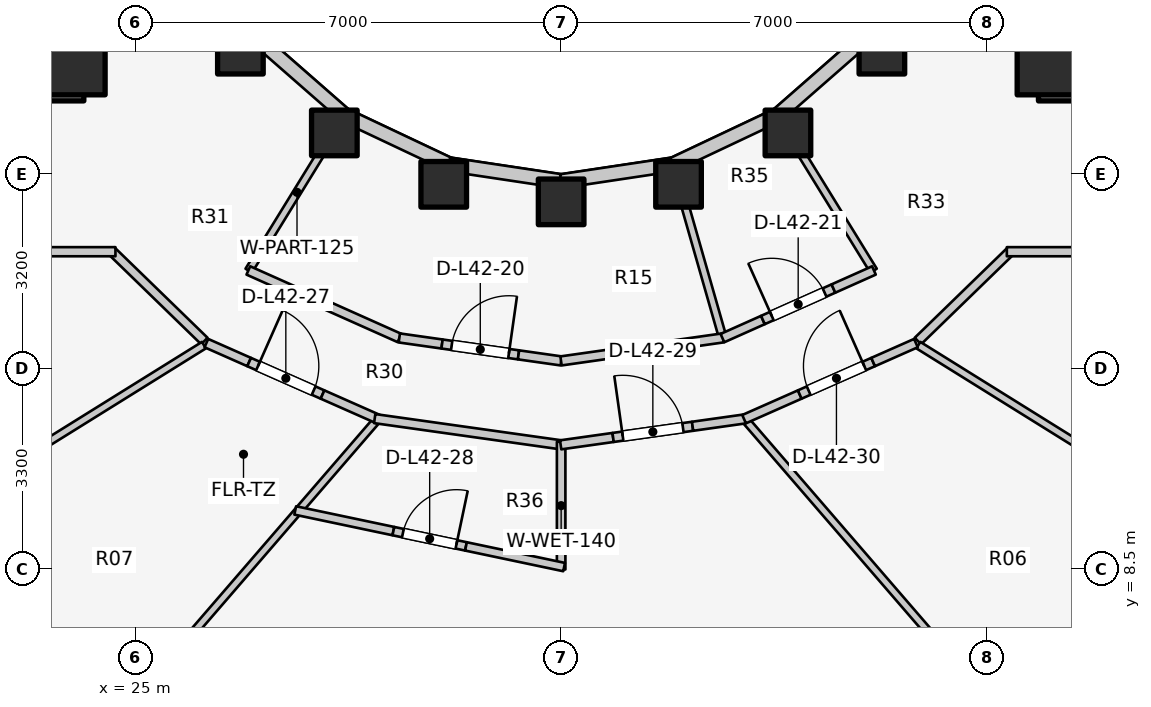
"""IFC4 building model, lengths in metres.
Left out: names, types, materials, properties, quantities, classifications, styles, units other than length and angle.
Written with IfcOpenShell. Run it as: python <this file> out.ifc"""

import sys

from ifc_helpers import new_model, si_unit, direction, frame, frame_2d, origin, origin_2d, place, context, subcontext, project, spatial, rectangle, extrude, element, fill, save


model = new_model("IFC4")
c1 = context("Model", 3, precision=1e-05, world=origin(), true_north=direction((0.0, 1.0)))
c2 = subcontext(c1, "Body", "Model", "MODEL_VIEW")
j1 = project(units=[si_unit("LENGTHUNIT", "METRE"), si_unit("PLANEANGLEUNIT", "RADIAN")], contexts=[c1])
p1 = place(None, origin())
s1 = spatial("IfcSite", under=j1, at=p1, CompositionType="ELEMENT")
p2 = place(p1, origin())
s2 = spatial("IfcBuilding", under=s1, at=p2, CompositionType="ELEMENT")
p3 = place(p2, frame((0.0, 0.0, 140.5)))
s3 = spatial("IfcBuildingStorey", under=s2, at=p3, CompositionType="ELEMENT", Elevation=140.5)
for number, where, z_axis, x_axis in (
    (1, (19.65, 16.55, 0.0), (0.0, 0.0, 1.0), (1.0, 0.0, 0.0)),
    (2, (39.85, 16.55, 0.0), (0.0, 0.0, 1.0), (1.0, 0.0, 0.0)),
):
    element("IfcWall", number, at=place(p3, frame(where, z_axis=z_axis, x_axis=x_axis)), inside=s3, PredefinedType="SHEAR", context=c2, shape_type="SweptSolid", body=[
        extrude(rectangle(XDim=4.5, YDim=0.7, at=frame_2d((2.25, 0.0))), origin(), (0.0, 0.0, 1.0), 3.1),
    ])
for number, where, z_axis, x_axis in (
    (3, (23.9, 16.9, 0.0), (0.0, 0.0, 1.0), (1.0, 0.0, 0.0)),
    (4, (40.1, 16.9, 0.0), (0.0, 0.0, 1.0), (1.0, 0.0, 0.0)),
):
    element("IfcColumn", number, at=place(p3, frame(where, z_axis=z_axis, x_axis=x_axis)), inside=s3, PredefinedType="COLUMN", context=c2, shape_type="SweptSolid", body=[
        extrude(rectangle(XDim=1.2, YDim=1.2, at=origin_2d()), origin(), (0.0, 0.0, 1.0), 3.1),
    ])
for number, where, z_axis, x_axis in (
    (5, (26.725, 17.018, 0.0), (0.0, 0.0, 1.0), (1.0, 0.0, 0.0)),
    (6, (28.27, 15.673, 0.0), (0.0, 0.0, 1.0), (1.0, 0.0, 0.0)),
    (7, (30.069, 14.828, 0.0), (0.0, 0.0, 1.0), (1.0, 0.0, 0.0)),
    (8, (32.0, 14.54, 0.0), (0.0, 0.0, 1.0), (1.0, 0.0, 0.0)),
    (9, (33.931, 14.828, 0.0), (0.0, 0.0, 1.0), (1.0, 0.0, 0.0)),
    (10, (35.73, 15.673, 0.0), (0.0, 0.0, 1.0), (1.0, 0.0, 0.0)),
    (11, (37.275, 17.018, 0.0), (0.0, 0.0, 1.0), (1.0, 0.0, 0.0)),
):
    element("IfcColumn", number, at=place(p3, frame(where, z_axis=z_axis, x_axis=x_axis)), inside=s3, PredefinedType="COLUMN", context=c2, shape_type="SweptSolid", body=[
        extrude(rectangle(XDim=0.75, YDim=0.75, at=origin_2d()), origin(), (0.0, 0.0, 1.0), 3.1),
    ])
p4 = place(p3, frame((26.965, 17.258, 0.0), z_axis=(0.0, 0.0, 1.0), x_axis=(0.752576694707, -0.658504607869, 0.0)))
e12 = element("IfcWall", 12, at=p4, inside=s3, PredefinedType="STANDARD", context=c2, shape_type="SweptSolid", body=[
    extrude(rectangle(XDim=1.959, YDim=0.23, at=frame_2d((0.98, 0.0))), origin(), (0.0, 0.0, 1.0), 1.22),
])
p5 = place(p3, frame((28.44, 15.968, 0.0), z_axis=(0.0, 0.0, 1.0), x_axis=(0.904179699603, -0.427152280606, 0.0)))
e13 = element("IfcWall", 13, at=p5, inside=s3, PredefinedType="STANDARD", context=c2, shape_type="SweptSolid", body=[
    extrude(rectangle(XDim=1.899, YDim=0.23, at=frame_2d((0.95, 0.0))), origin(), (0.0, 0.0, 1.0), 1.22),
])
for number, where, z_axis, x_axis in (
    (14, (30.157, 15.157, 0.0), (0.0, 0.0, 1.0), (0.989, -0.149, 0.0)),
    (15, (32.0, 14.88, 0.0), (0.0, 0.0, 1.0), (0.989, 0.149, 0.0)),
):
    element("IfcWall", number, at=place(p3, frame(where, z_axis=z_axis, x_axis=x_axis)), inside=s3, PredefinedType="STANDARD", context=c2, shape_type="SweptSolid", body=[
        extrude(rectangle(XDim=1.864, YDim=0.23, at=frame_2d((0.932, 0.0))), origin(), (0.0, 0.0, 1.0), 1.22),
    ])
p6 = place(p3, frame((33.843, 15.157, 0.0), z_axis=(0.0, 0.0, 1.0), x_axis=(0.904179699603, 0.427152280606, 0.0)))
e16 = element("IfcWall", 16, at=p6, inside=s3, PredefinedType="STANDARD", context=c2, shape_type="SweptSolid", body=[
    extrude(rectangle(XDim=1.899, YDim=0.23, at=frame_2d((0.95, 0.0))), origin(), (0.0, 0.0, 1.0), 1.22),
])
p7 = place(p3, frame((35.56, 15.968, 0.0), z_axis=(0.0, 0.0, 1.0), x_axis=(0.752576694707, 0.658504607869, 0.0)))
e17 = element("IfcWall", 17, at=p7, inside=s3, PredefinedType="STANDARD", context=c2, shape_type="SweptSolid", body=[
    extrude(rectangle(XDim=1.959, YDim=0.23, at=frame_2d((0.98, 0.0))), origin(), (0.0, 0.0, 1.0), 1.22),
])
p8 = place(p3, frame((19.587, 7.581, 0.0), z_axis=(0.0, 0.0, 1.0), x_axis=(0.912353637112, -0.409403029847, 0.0)))
e18 = element("IfcWall", 18, at=p8, inside=s3, PredefinedType="STANDARD", context=c2, shape_type="SweptSolid", body=[
    extrude(rectangle(XDim=5.533, YDim=0.26, at=frame_2d((2.766, 0.0))), origin(), (0.0, 0.0, 1.0), 1.22),
])
p9 = place(p8, frame((2.167, 0.0, 0.15)))
e19 = element("IfcOpeningElement", 19, at=p9, cuts=e18, PredefinedType="OPENING", context=c2, shape_type="SweptSolid", body=[
    extrude(rectangle(XDim=1.2, YDim=0.9, at=frame_2d((0.6, 0.45))), frame((0.0, 0.14, 0.0), z_axis=(0.0, -1.0, 0.0), x_axis=(1.0, 0.0, 0.0)), (0.0, 0.0, 1.0), 0.28),
])
p10 = place(p3, frame((39.365, 5.315, 0.0), z_axis=(0.0, 0.0, 1.0), x_axis=(0.912353637112, 0.409403029847, 0.0)))
e20 = element("IfcWall", 20, at=p10, inside=s3, PredefinedType="STANDARD", context=c2, shape_type="SweptSolid", body=[
    extrude(rectangle(XDim=5.533, YDim=0.26, at=frame_2d((2.766, 0.0))), origin(), (0.0, 0.0, 1.0), 1.22),
])
p11 = place(p10, frame((2.167, 0.0, 0.15)))
e21 = element("IfcOpeningElement", 21, at=p11, cuts=e20, PredefinedType="OPENING", context=c2, shape_type="SweptSolid", body=[
    extrude(rectangle(XDim=1.2, YDim=0.9, at=frame_2d((0.6, 0.45))), frame((0.0, 0.14, 0.0), z_axis=(0.0, -1.0, 0.0), x_axis=(1.0, 0.0, 0.0)), (0.0, 0.0, 1.0), 0.28),
])
p12 = place(p3, frame((26.133, 12.251, 0.0), z_axis=(0.0, 0.0, 1.0), x_axis=(-0.717419568599, 0.696641344302, 0.0)))
e22 = element("IfcWall", 22, at=p12, inside=s3, PredefinedType="PARTITIONING", context=c2, shape_type="SweptSolid", body=[
    extrude(rectangle(XDim=2.138, YDim=0.15, at=frame_2d((1.069, 0.0))), origin(), (0.0, 0.0, 1.0), 2.019),
])
p13 = place(p3, frame((19.51, 13.72, 0.0), z_axis=(0.0, 0.0, 1.0), x_axis=(1.0, 0.0, 0.0)))
e23 = element("IfcWall", 23, at=p13, inside=s3, PredefinedType="PARTITIONING", context=c2, shape_type="SweptSolid", body=[
    extrude(rectangle(XDim=5.16, YDim=0.15, at=frame_2d((2.58, 0.0))), origin(), (0.0, 0.0, 1.0), 2.019),
])
p14 = place(p3, frame((37.867, 12.251, 0.0), z_axis=(0.0, 0.0, 1.0), x_axis=(0.717419568599, 0.696641344302, 0.0)))
e24 = element("IfcWall", 24, at=p14, inside=s3, PredefinedType="PARTITIONING", context=c2, shape_type="SweptSolid", body=[
    extrude(rectangle(XDim=2.138, YDim=0.15, at=frame_2d((1.069, 0.0))), origin(), (0.0, 0.0, 1.0), 2.019),
])
p15 = place(p3, frame((39.33, 13.72, 0.0), z_axis=(0.0, 0.0, 1.0), x_axis=(1.0, 0.0, 0.0)))
e25 = element("IfcWall", 25, at=p15, inside=s3, PredefinedType="PARTITIONING", context=c2, shape_type="SweptSolid", body=[
    extrude(rectangle(XDim=5.06, YDim=0.15, at=frame_2d((2.53, 0.0))), origin(), (0.0, 0.0, 1.0), 2.019),
])
p16 = place(p3, frame((28.45, 15.985, 0.0), z_axis=(0.0, 0.0, 1.0), x_axis=(-0.524565340045, -0.851370192116, 0.0)))
e26 = element("IfcWall", 26, at=p16, inside=s3, PredefinedType="PARTITIONING", context=c2, shape_type="SweptSolid", body=[
    extrude(rectangle(XDim=3.027, YDim=0.125, at=frame_2d((1.514, 0.0))), origin(), (0.0, 0.0, 1.0), 2.019),
])
p17 = place(p3, frame((33.838, 15.176, 0.0), z_axis=(0.0, 0.0, 1.0), x_axis=(0.274947609893, -0.961459209647, 0.0)))
e27 = element("IfcWall", 27, at=p17, inside=s3, PredefinedType="PARTITIONING", context=c2, shape_type="SweptSolid", body=[
    extrude(rectangle(XDim=2.99, YDim=0.125, at=frame_2d((1.495, 0.0))), origin(), (0.0, 0.0, 1.0), 2.019),
])
p18 = place(p3, frame((35.55, 15.985, 0.0), z_axis=(0.0, 0.0, 1.0), x_axis=(0.524565340045, -0.851370192116, 0.0)))
e28 = element("IfcWall", 28, at=p18, inside=s3, PredefinedType="PARTITIONING", context=c2, shape_type="SweptSolid", body=[
    extrude(rectangle(XDim=3.027, YDim=0.125, at=frame_2d((1.514, 0.0))), origin(), (0.0, 0.0, 1.0), 2.019),
])
p19 = place(p3, frame((26.856, 13.412, 0.0), z_axis=(0.0, 0.0, 1.0), x_axis=(0.912985265053, -0.407992531545, 0.0)))
e29 = element("IfcWall", 29, at=p19, inside=s3, PredefinedType="PARTITIONING", context=c2, shape_type="SweptSolid", body=[
    extrude(rectangle(XDim=2.723, YDim=0.15, at=frame_2d((1.362, 0.0))), origin(), (0.0, 0.0, 1.0), 2.019),
])
p20 = place(p3, frame((29.339, 12.302, 0.0), z_axis=(0.0, 0.0, 1.0), x_axis=(0.99005923875, -0.140650999878, 0.0)))
e30 = element("IfcWall", 30, at=p20, inside=s3, PredefinedType="PARTITIONING", context=c2, shape_type="SweptSolid", body=[
    extrude(rectangle(XDim=0.71, YDim=0.15, at=frame_2d((0.355, 0.0))), origin(), (0.0, 0.0, 1.0), 2.575),
])
p21 = place(p3, frame((30.042, 12.202, 0.0), z_axis=(0.0, 0.0, 1.0), x_axis=(0.990075978744, -0.140533114653, 0.0)))
e31 = element("IfcWall", 31, at=p21, inside=s3, PredefinedType="PARTITIONING", context=c2, shape_type="SweptSolid", body=[
    extrude(rectangle(XDim=1.27, YDim=0.15, at=frame_2d((0.635, 0.0))), origin(), (0.0, 0.0, 1.0), 2.575),
])
p22 = place(p21, frame((0.16, 0.0, 0.0)))
e32 = element("IfcOpeningElement", 32, at=p22, cuts=e31, PredefinedType="OPENING", context=c2, shape_type="SweptSolid", body=[
    extrude(rectangle(XDim=0.95, YDim=2.1, at=frame_2d((0.475, 1.05))), frame((0.0, 0.085, 0.0), z_axis=(0.0, -1.0, 0.0), x_axis=(1.0, 0.0, 0.0)), (0.0, 0.0, 1.0), 0.17),
])
p23 = place(p3, frame((31.299, 12.024, 0.0), z_axis=(0.0, 0.0, 1.0), x_axis=(0.990107071323, -0.140313888538, 0.0)))
e33 = element("IfcWall", 33, at=p23, inside=s3, PredefinedType="PARTITIONING", context=c2, shape_type="SweptSolid", body=[
    extrude(rectangle(XDim=0.71, YDim=0.15, at=frame_2d((0.355, 0.0))), origin(), (0.0, 0.0, 1.0), 2.019),
])
p24 = place(p3, frame((31.998, 11.924, 0.0), z_axis=(0.0, 0.0, 1.0), x_axis=(0.990041682628, 0.140774524184, 0.0)))
e34 = element("IfcWall", 34, at=p24, inside=s3, PredefinedType="PARTITIONING", context=c2, shape_type="SweptSolid", body=[
    extrude(rectangle(XDim=2.695, YDim=0.15, at=frame_2d((1.348, 0.0))), origin(), (0.0, 0.0, 1.0), 2.019),
])
p25 = place(p3, frame((34.653, 12.299, 0.0), z_axis=(0.0, 0.0, 1.0), x_axis=(0.913120081969, 0.407690711084, 0.0)))
e35 = element("IfcWall", 35, at=p25, inside=s3, PredefinedType="PARTITIONING", context=c2, shape_type="SweptSolid", body=[
    extrude(rectangle(XDim=0.729, YDim=0.15, at=frame_2d((0.365, 0.0))), origin(), (0.0, 0.0, 1.0), 2.019),
])
p26 = place(p3, frame((35.319, 12.597, 0.0), z_axis=(0.0, 0.0, 1.0), x_axis=(0.913104656548, 0.407725258219, 0.0)))
e36 = element("IfcWall", 36, at=p26, inside=s3, PredefinedType="PARTITIONING", context=c2, shape_type="SweptSolid", body=[
    extrude(rectangle(XDim=1.27, YDim=0.15, at=frame_2d((0.635, 0.0))), origin(), (0.0, 0.0, 1.0), 2.16),
])
p27 = place(p26, frame((0.16, 0.0, 0.0)))
e37 = element("IfcOpeningElement", 37, at=p27, cuts=e36, PredefinedType="OPENING", context=c2, shape_type="SweptSolid", body=[
    extrude(rectangle(XDim=0.95, YDim=2.1, at=frame_2d((0.475, 1.05))), frame((0.0, 0.085, 0.0), z_axis=(0.0, -1.0, 0.0), x_axis=(1.0, 0.0, 0.0)), (0.0, 0.0, 1.0), 0.17),
])
p28 = place(p3, frame((36.478, 13.115, 0.0), z_axis=(0.0, 0.0, 1.0), x_axis=(0.913120081969, 0.407690711084, 0.0)))
e38 = element("IfcWall", 38, at=p28, inside=s3, PredefinedType="PARTITIONING", context=c2, shape_type="SweptSolid", body=[
    extrude(rectangle(XDim=0.729, YDim=0.15, at=frame_2d((0.365, 0.0))), origin(), (0.0, 0.0, 1.0), 2.575),
])
p29 = place(p3, frame((26.125, 12.184, 0.0), z_axis=(0.0, 0.0, 1.0), x_axis=(-0.849008457073, -0.528379257559, 0.0)))
e39 = element("IfcWall", 39, at=p29, inside=s3, PredefinedType="PARTITIONING", context=c2, shape_type="SweptSolid", body=[
    extrude(rectangle(XDim=7.077, YDim=0.125, at=frame_2d((3.539, 0.0))), origin(), (0.0, 0.0, 1.0), 1.22),
])
for number, where, z_axis, x_axis in (
    (40, (28.947, 10.927, 0.0), (0.0, 0.0, 1.0), (-0.654, -0.757, 0.0)),
    (41, (35.053, 10.927, 0.0), (0.0, 0.0, 1.0), (0.654, -0.757, 0.0)),
):
    element("IfcWall", number, at=place(p3, frame(where, z_axis=z_axis, x_axis=x_axis)), inside=s3, PredefinedType="PARTITIONING", context=c2, shape_type="SweptSolid", body=[
        extrude(rectangle(XDim=6.14, YDim=0.125, at=frame_2d((3.07, 0.0))), origin(), (0.0, 0.0, 1.0), 1.22),
    ])
p30 = place(p3, frame((37.875, 12.184, 0.0), z_axis=(0.0, 0.0, 1.0), x_axis=(0.849008457073, -0.528379257559, 0.0)))
e42 = element("IfcWall", 42, at=p30, inside=s3, PredefinedType="PARTITIONING", context=c2, shape_type="SweptSolid", body=[
    extrude(rectangle(XDim=7.077, YDim=0.125, at=frame_2d((3.539, 0.0))), origin(), (0.0, 0.0, 1.0), 1.22),
])
p31 = place(p3, frame((26.165, 12.217, 0.0), z_axis=(0.0, 0.0, 1.0), x_axis=(0.914386304715, -0.404842791401, 0.0)))
e43 = element("IfcWall", 43, at=p31, inside=s3, PredefinedType="PARTITIONING", context=c2, shape_type="SweptSolid", body=[
    extrude(rectangle(XDim=0.77, YDim=0.15, at=frame_2d((0.385, 0.0))), origin(), (0.0, 0.0, 1.0), 2.575),
])
p32 = place(p3, frame((26.869, 11.906, 0.0), z_axis=(0.0, 0.0, 1.0), x_axis=(0.914451103971, -0.404696402809, 0.0)))
e44 = element("IfcWall", 44, at=p32, inside=s3, PredefinedType="PARTITIONING", context=c2, shape_type="SweptSolid", body=[
    extrude(rectangle(XDim=1.32, YDim=0.15, at=frame_2d((0.66, 0.0))), origin(), (0.0, 0.0, 1.0), 2.16),
])
p33 = place(p32, frame((0.16, 0.0, 0.0)))
e45 = element("IfcOpeningElement", 45, at=p33, cuts=e44, PredefinedType="OPENING", context=c2, shape_type="SweptSolid", body=[
    extrude(rectangle(XDim=1.0, YDim=2.1, at=frame_2d((0.5, 1.05))), frame((0.0, 0.085, 0.0), z_axis=(0.0, -1.0, 0.0), x_axis=(1.0, 0.0, 0.0)), (0.0, 0.0, 1.0), 0.17),
])
p34 = place(p3, frame((28.076, 11.371, 0.0), z_axis=(0.0, 0.0, 1.0), x_axis=(0.914504106684, -0.404576616797, 0.0)))
e46 = element("IfcWall", 46, at=p34, inside=s3, PredefinedType="PARTITIONING", context=c2, shape_type="SweptSolid", body=[
    extrude(rectangle(XDim=1.001, YDim=0.15, at=frame_2d((0.5, 0.0))), origin(), (0.0, 0.0, 1.0), 2.019),
])
p35 = place(p3, frame((28.934, 10.975, 0.0), z_axis=(0.0, 0.0, 1.0), x_axis=(0.990254405439, -0.139270285808, 0.0)))
e47 = element("IfcWall", 47, at=p35, inside=s3, PredefinedType="PARTITIONING", context=c2, shape_type="SweptSolid", body=[
    extrude(rectangle(XDim=3.147, YDim=0.15, at=frame_2d((1.573, 0.0))), origin(), (0.0, 0.0, 1.0), 2.019),
])
p36 = place(p3, frame((32.0, 10.594, 0.0), z_axis=(0.0, 0.0, 1.0), x_axis=(0.0, -1.0, 0.0)))
e48 = element("IfcWall", 48, at=p36, inside=s3, PredefinedType="PLUMBINGWALL", context=c2, shape_type="SweptSolid", body=[
    extrude(rectangle(XDim=2.1, YDim=0.14, at=frame_2d((1.05, 0.0))), origin(), (0.0, 0.0, 1.0), 2.019),
])
p37 = place(p3, frame((27.627, 9.465, 0.0), z_axis=(0.0, 0.0, 1.0), x_axis=(0.978519940891, -0.206152189604, 0.0)))
e49 = element("IfcWall", 49, at=p37, inside=s3, PredefinedType="PLUMBINGWALL", context=c2, shape_type="SweptSolid", body=[
    extrude(rectangle(XDim=1.65, YDim=0.14, at=frame_2d((0.825, 0.0))), origin(), (0.0, 0.0, 1.0), 2.575),
])
p38 = place(p3, frame((29.241, 9.125, 0.0), z_axis=(0.0, 0.0, 1.0), x_axis=(0.978528548163, -0.206111330186, 0.0)))
e50 = element("IfcWall", 50, at=p38, inside=s3, PredefinedType="PLUMBINGWALL", context=c2, shape_type="SweptSolid", body=[
    extrude(rectangle(XDim=1.22, YDim=0.14, at=frame_2d((0.61, 0.0))), origin(), (0.0, 0.0, 1.0), 2.575),
])
p39 = place(p38, frame((0.16, 0.0, 0.0)))
e51 = element("IfcOpeningElement", 51, at=p39, cuts=e50, PredefinedType="OPENING", context=c2, shape_type="SweptSolid", body=[
    extrude(rectangle(XDim=0.9, YDim=2.1, at=frame_2d((0.45, 1.05))), frame((0.0, 0.08, 0.0), z_axis=(0.0, -1.0, 0.0), x_axis=(1.0, 0.0, 0.0)), (0.0, 0.0, 1.0), 0.16),
])
p40 = place(p3, frame((30.435, 8.874, 0.0), z_axis=(0.0, 0.0, 1.0), x_axis=(0.978513650074, -0.206182047278, 0.0)))
e52 = element("IfcWall", 52, at=p40, inside=s3, PredefinedType="PLUMBINGWALL", context=c2, shape_type="SweptSolid", body=[
    extrude(rectangle(XDim=1.649, YDim=0.14, at=frame_2d((0.825, 0.0))), origin(), (0.0, 0.0, 1.0), 2.019),
])
p41 = place(p3, frame((31.992, 10.544, 0.0), z_axis=(0.0, 0.0, 1.0), x_axis=(0.990255371296, 0.139263418091, 0.0)))
e53 = element("IfcWall", 53, at=p41, inside=s3, PredefinedType="PARTITIONING", context=c2, shape_type="SweptSolid", body=[
    extrude(rectangle(XDim=0.871, YDim=0.15, at=frame_2d((0.436, 0.0))), origin(), (0.0, 0.0, 1.0), 2.019),
])
p42 = place(p3, frame((32.855, 10.665, 0.0), z_axis=(0.0, 0.0, 1.0), x_axis=(0.990228663531, 0.139453196171, 0.0)))
e54 = element("IfcWall", 54, at=p42, inside=s3, PredefinedType="PARTITIONING", context=c2, shape_type="SweptSolid", body=[
    extrude(rectangle(XDim=1.32, YDim=0.15, at=frame_2d((0.66, 0.0))), origin(), (0.0, 0.0, 1.0), 2.575),
])
p43 = place(p42, frame((0.16, 0.0, 0.0)))
e55 = element("IfcOpeningElement", 55, at=p43, cuts=e54, PredefinedType="OPENING", context=c2, shape_type="SweptSolid", body=[
    extrude(rectangle(XDim=1.0, YDim=2.1, at=frame_2d((0.5, 1.05))), frame((0.0, 0.085, 0.0), z_axis=(0.0, -1.0, 0.0), x_axis=(1.0, 0.0, 0.0)), (0.0, 0.0, 1.0), 0.17),
])
p44 = place(p3, frame((34.162, 10.849, 0.0), z_axis=(0.0, 0.0, 1.0), x_axis=(0.990255371296, 0.139263418091, 0.0)))
e56 = element("IfcWall", 56, at=p44, inside=s3, PredefinedType="PARTITIONING", context=c2, shape_type="SweptSolid", body=[
    extrude(rectangle(XDim=0.871, YDim=0.15, at=frame_2d((0.436, 0.0))), origin(), (0.0, 0.0, 1.0), 2.575),
])
p45 = place(p3, frame((35.009, 10.966, 0.0), z_axis=(0.0, 0.0, 1.0), x_axis=(0.914504106684, 0.404576616797, 0.0)))
e57 = element("IfcWall", 57, at=p45, inside=s3, PredefinedType="PARTITIONING", context=c2, shape_type="SweptSolid", body=[
    extrude(rectangle(XDim=1.001, YDim=0.15, at=frame_2d((0.5, 0.0))), origin(), (0.0, 0.0, 1.0), 2.019),
])
p46 = place(p3, frame((35.924, 11.371, 0.0), z_axis=(0.0, 0.0, 1.0), x_axis=(0.914451103971, 0.404696402809, 0.0)))
e58 = element("IfcWall", 58, at=p46, inside=s3, PredefinedType="PARTITIONING", context=c2, shape_type="SweptSolid", body=[
    extrude(rectangle(XDim=1.32, YDim=0.15, at=frame_2d((0.66, 0.0))), origin(), (0.0, 0.0, 1.0), 2.16),
])
p47 = place(p46, frame((0.16, 0.0, 0.0)))
e59 = element("IfcOpeningElement", 59, at=p47, cuts=e58, PredefinedType="OPENING", context=c2, shape_type="SweptSolid", body=[
    extrude(rectangle(XDim=1.0, YDim=2.1, at=frame_2d((0.5, 1.05))), frame((0.0, 0.085, 0.0), z_axis=(0.0, -1.0, 0.0), x_axis=(1.0, 0.0, 0.0)), (0.0, 0.0, 1.0), 0.17),
])
p48 = place(p3, frame((37.131, 11.906, 0.0), z_axis=(0.0, 0.0, 1.0), x_axis=(0.914386304715, 0.404842791401, 0.0)))
e60 = element("IfcWall", 60, at=p48, inside=s3, PredefinedType="PARTITIONING", context=c2, shape_type="SweptSolid", body=[
    extrude(rectangle(XDim=0.77, YDim=0.15, at=frame_2d((0.385, 0.0))), origin(), (0.0, 0.0, 1.0), 2.575),
])
p49 = place(p22, origin())
e61 = element("IfcDoor", 61, at=p49, inside=s3, OperationType="SINGLE_SWING_RIGHT", PredefinedType="DOOR", context=c2, shape_type="SweptSolid", body=[
    extrude(rectangle(XDim=0.95, YDim=2.1, at=frame_2d((0.475, 1.05))), frame((0.0, 0.025, 0.0), z_axis=(0.0, -1.0, 0.0), x_axis=(1.0, 0.0, 0.0)), (0.0, 0.0, 1.0), 0.05),
])
fill(e32, e61)
p50 = place(p27, origin())
e62 = element("IfcDoor", 62, at=p50, inside=s3, OperationType="SINGLE_SWING_LEFT", PredefinedType="DOOR", context=c2, shape_type="SweptSolid", body=[
    extrude(rectangle(XDim=0.95, YDim=2.1, at=frame_2d((0.475, 1.05))), frame((0.0, 0.025, 0.0), z_axis=(0.0, -1.0, 0.0), x_axis=(1.0, 0.0, 0.0)), (0.0, 0.0, 1.0), 0.05),
])
fill(e37, e62)
p51 = place(p33, origin())
e63 = element("IfcDoor", 63, at=p51, inside=s3, OperationType="SINGLE_SWING_LEFT", PredefinedType="DOOR", context=c2, shape_type="SweptSolid", body=[
    extrude(rectangle(XDim=1.0, YDim=2.1, at=frame_2d((0.5, 1.05))), frame((0.0, 0.025, 0.0), z_axis=(0.0, -1.0, 0.0), x_axis=(1.0, 0.0, 0.0)), (0.0, 0.0, 1.0), 0.05),
])
fill(e45, e63)
p52 = place(p39, origin())
e64 = element("IfcDoor", 64, at=p52, inside=s3, OperationType="SINGLE_SWING_RIGHT", PredefinedType="DOOR", context=c2, shape_type="SweptSolid", body=[
    extrude(rectangle(XDim=0.9, YDim=2.1, at=frame_2d((0.45, 1.05))), frame((0.0, 0.025, 0.0), z_axis=(0.0, -1.0, 0.0), x_axis=(1.0, 0.0, 0.0)), (0.0, 0.0, 1.0), 0.05),
])
fill(e51, e64)
p53 = place(p43, origin())
e65 = element("IfcDoor", 65, at=p53, inside=s3, OperationType="SINGLE_SWING_LEFT", PredefinedType="DOOR", context=c2, shape_type="SweptSolid", body=[
    extrude(rectangle(XDim=1.0, YDim=2.1, at=frame_2d((0.5, 1.05))), frame((0.0, 0.025, 0.0), z_axis=(0.0, -1.0, 0.0), x_axis=(1.0, 0.0, 0.0)), (0.0, 0.0, 1.0), 0.05),
])
fill(e55, e65)
p54 = place(p47, origin())
e66 = element("IfcDoor", 66, at=p54, inside=s3, OperationType="SINGLE_SWING_RIGHT", PredefinedType="DOOR", context=c2, shape_type="SweptSolid", body=[
    extrude(rectangle(XDim=1.0, YDim=2.1, at=frame_2d((0.5, 1.05))), frame((0.0, 0.025, 0.0), z_axis=(0.0, -1.0, 0.0), x_axis=(1.0, 0.0, 0.0)), (0.0, 0.0, 1.0), 0.05),
])
fill(e59, e66)
save(model, sys.argv[1])
